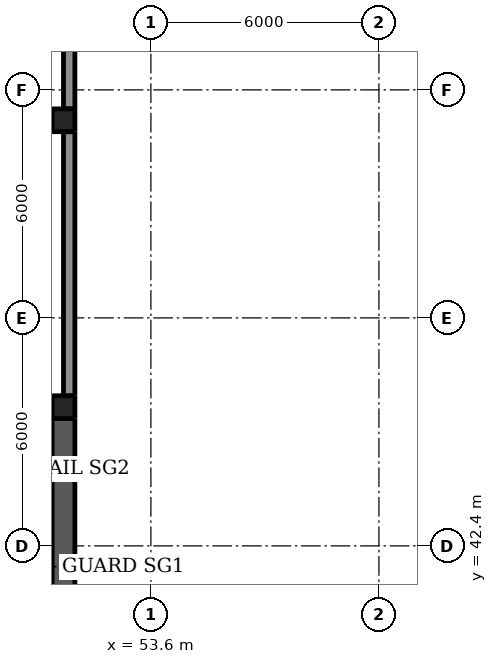
"""IFC4 building model, lengths in metres.
Left out: names, types, materials, properties, quantities, classifications, styles, units other than length and angle.
Written with IfcOpenShell. Run it as: python <this file> out.ifc"""

import sys

from ifc_helpers import new_model, si_unit, direction, frame, frame_2d, origin, origin_2d, place, context, subcontext, project, spatial, rectangle, extrude, element, fill, save


model = new_model("IFC4")
c1 = context("Model", 3, precision=1e-05, world=origin(), true_north=direction((0.0, 1.0)))
c2 = subcontext(c1, "Body", "Model", "MODEL_VIEW")
j1 = project(units=[si_unit("LENGTHUNIT", "METRE"), si_unit("PLANEANGLEUNIT", "RADIAN")], contexts=[c1])
p1 = place(None, origin())
s1 = spatial("IfcSite", under=j1, at=p1, CompositionType="ELEMENT")
p2 = place(p1, origin())
s2 = spatial("IfcBuilding", under=s1, at=p2, CompositionType="ELEMENT")
p3 = place(p2, frame((0.0, 0.0, 19.0)))
s3 = spatial("IfcBuildingStorey", under=s2, at=p3, CompositionType="ELEMENT", Elevation=19.0)
for number, where, z_axis, x_axis in (
    (1, (52.6, 42.4, 0.0), (0.0, 0.0, 1.0), (1.0, 0.0, 0.0)),
    (2, (52.6, 48.4, 0.0), (0.0, 0.0, 1.0), (1.0, 0.0, 0.0)),
    (3, (52.6, 54.4, 0.0), (0.0, 0.0, 1.0), (1.0, 0.0, 0.0)),
):
    element("IfcColumn", number, at=place(p3, frame(where, z_axis=z_axis, x_axis=x_axis)), inside=s3, PredefinedType="COLUMN", context=c2, shape_type="SweptSolid", body=[
        extrude(rectangle(XDim=1.2, YDim=1.2, at=origin_2d()), origin(), (0.0, 0.0, 1.0), 4.25),
    ])
for number, where, z_axis, x_axis in (
    (4, (51.3, 46.05, -0.3), (0.0, 0.0, 1.0), (1.0, 0.0, 0.0)),
    (5, (51.3, 53.6, -0.3), (0.0, 0.0, 1.0), (1.0, 0.0, 0.0)),
):
    element("IfcColumn", number, at=place(p3, frame(where, z_axis=z_axis, x_axis=x_axis)), inside=s3, PredefinedType="COLUMN", context=c2, shape_type="SweptSolid", body=[
        extrude(rectangle(XDim=0.6, YDim=0.6, at=origin_2d()), origin(), (0.0, 0.0, 1.0), 4.35),
    ])
p4 = place(p3, frame((51.3, 38.8, -0.3), z_axis=(0.0, 0.0, 1.0), x_axis=(0.0, 1.0, 0.0)))
e6 = element("IfcWall", 6, at=p4, inside=s3, PredefinedType="SHEAR", context=c2, shape_type="SweptSolid", body=[
    extrude(rectangle(XDim=6.95, YDim=0.6, at=frame_2d((3.475, 0.0))), origin(), (0.0, 0.0, 1.0), 4.8),
])
for number, where, z_axis, x_axis in (
    (7, (52.125, 37.0, 0.0), (0.0, 0.0, 1.0), (0.0, 1.0, 0.0)),
    (8, (52.125, 43.0, 0.0), (0.0, 0.0, 1.0), (0.0, 1.0, 0.0)),
    (9, (52.125, 49.0, 0.0), (0.0, 0.0, 1.0), (0.0, 1.0, 0.0)),
    (10, (52.125, 55.0, 0.0), (0.0, 0.0, 1.0), (0.0, 1.0, 0.0)),
):
    element("IfcWall", number, at=place(p3, frame(where, z_axis=z_axis, x_axis=x_axis)), inside=s3, PredefinedType="SOLIDWALL", context=c2, shape_type="SweptSolid", body=[
        extrude(rectangle(XDim=4.8, YDim=0.25, at=frame_2d((2.4, 0.0))), origin(), (0.0, 0.0, 1.0), 4.25),
    ])
p5 = place(p3, frame((51.45, 46.35, 0.0), z_axis=(0.0, 0.0, 1.0), x_axis=(0.0, 1.0, 0.0)))
e11 = element("IfcWall", 11, at=p5, inside=s3, PredefinedType="SOLIDWALL", context=c2, shape_type="SweptSolid", body=[
    extrude(rectangle(XDim=6.95, YDim=0.3, at=frame_2d((3.475, 0.0))), origin(), (0.0, 0.0, 1.0), 3.15),
])
p6 = place(p3, frame((51.45, 53.9, 0.0), z_axis=(0.0, 0.0, 1.0), x_axis=(0.0, 1.0, 0.0)))
e12 = element("IfcWall", 12, at=p6, inside=s3, PredefinedType="SOLIDWALL", context=c2, shape_type="SweptSolid", body=[
    extrude(rectangle(XDim=6.95, YDim=0.3, at=frame_2d((3.475, 0.0))), origin(), (0.0, 0.0, 1.0), 3.15),
])
p7 = place(p3, frame((53.2, 42.4, 0.0), z_axis=(0.0, 0.0, 1.0), x_axis=(1.0, 0.0, 0.0)))
e13 = element("IfcWall", 13, at=p7, inside=s3, PredefinedType="PARTITIONING", context=c2, shape_type="SweptSolid", body=[
    extrude(rectangle(XDim=6.325, YDim=0.1, at=frame_2d((3.163, 0.0))), origin(), (0.0, 0.0, 1.0), 3.415),
])
p8 = place(p3, frame((53.2, 54.4, 0.0), z_axis=(0.0, 0.0, 1.0), x_axis=(1.0, 0.0, 0.0)))
e14 = element("IfcWall", 14, at=p8, inside=s3, PredefinedType="PARTITIONING", context=c2, shape_type="SweptSolid", body=[
    extrude(rectangle(XDim=6.325, YDim=0.1, at=frame_2d((3.163, 0.0))), origin(), (0.0, 0.0, 1.0), 3.409),
])
p9 = place(p3, frame((59.6, 36.546, 0.0), z_axis=(0.0, 0.0, 1.0), x_axis=(0.0, 1.0, 0.0)))
e15 = element("IfcWall", 15, at=p9, inside=s3, PredefinedType="PARTITIONING", context=c2, shape_type="SweptSolid", body=[
    extrude(rectangle(XDim=5.708, YDim=0.15, at=frame_2d((2.854, 0.0))), origin(), (0.0, 0.0, 1.0), 4.25),
])
p10 = place(p9, frame((0.204, 0.0, 0.0)))
e16 = element("IfcOpeningElement", 16, at=p10, cuts=e15, PredefinedType="OPENING", context=c2, shape_type="SweptSolid", body=[
    extrude(rectangle(XDim=1.8, YDim=2.1, at=frame_2d((0.9, 1.05))), frame((0.0, 0.085, 0.0), z_axis=(0.0, -1.0, 0.0), x_axis=(1.0, 0.0, 0.0)), (0.0, 0.0, 1.0), 0.17),
])
p11 = place(p3, frame((59.6, 42.254, 0.0), z_axis=(0.0, 0.0, 1.0), x_axis=(0.0, 1.0, 0.0)))
e17 = element("IfcWall", 17, at=p11, inside=s3, PredefinedType="PARTITIONING", context=c2, shape_type="SweptSolid", body=[
    extrude(rectangle(XDim=0.292, YDim=0.15, at=frame_2d((0.146, 0.0))), origin(), (0.0, 0.0, 1.0), 3.415),
])
p12 = place(p3, frame((59.6, 42.546, 0.0), z_axis=(0.0, 0.0, 1.0), x_axis=(0.0, 1.0, 0.0)))
e18 = element("IfcWall", 18, at=p12, inside=s3, PredefinedType="PARTITIONING", context=c2, shape_type="SweptSolid", body=[
    extrude(rectangle(XDim=5.708, YDim=0.15, at=frame_2d((2.854, 0.0))), origin(), (0.0, 0.0, 1.0), 4.25),
])
p13 = place(p3, frame((59.6, 48.254, 0.0), z_axis=(0.0, 0.0, 1.0), x_axis=(0.0, 1.0, 0.0)))
e19 = element("IfcWall", 19, at=p13, inside=s3, PredefinedType="PARTITIONING", context=c2, shape_type="SweptSolid", body=[
    extrude(rectangle(XDim=0.292, YDim=0.15, at=frame_2d((0.146, 0.0))), origin(), (0.0, 0.0, 1.0), 3.415),
])
p14 = place(p3, frame((59.6, 48.546, 0.0), z_axis=(0.0, 0.0, 1.0), x_axis=(0.0, 1.0, 0.0)))
e20 = element("IfcWall", 20, at=p14, inside=s3, PredefinedType="PARTITIONING", context=c2, shape_type="SweptSolid", body=[
    extrude(rectangle(XDim=5.708, YDim=0.15, at=frame_2d((2.854, 0.0))), origin(), (0.0, 0.0, 1.0), 4.25),
])
p15 = place(p14, frame((0.204, 0.0, 0.0)))
e21 = element("IfcOpeningElement", 21, at=p15, cuts=e20, PredefinedType="OPENING", context=c2, shape_type="SweptSolid", body=[
    extrude(rectangle(XDim=1.8, YDim=2.1, at=frame_2d((0.9, 1.05))), frame((0.0, 0.085, 0.0), z_axis=(0.0, -1.0, 0.0), x_axis=(1.0, 0.0, 0.0)), (0.0, 0.0, 1.0), 0.17),
])
p16 = place(p3, frame((59.6, 54.254, 0.0), z_axis=(0.0, 0.0, 1.0), x_axis=(0.0, 1.0, 0.0)))
e22 = element("IfcWall", 22, at=p16, inside=s3, PredefinedType="PARTITIONING", context=c2, shape_type="SweptSolid", body=[
    extrude(rectangle(XDim=0.287, YDim=0.15, at=frame_2d((0.143, 0.0))), origin(), (0.0, 0.0, 1.0), 3.409),
])
p17 = place(p3, frame((59.6, 54.546, 0.0), z_axis=(0.0, 0.0, 1.0), x_axis=(0.0, 1.0, 0.0)))
e23 = element("IfcWall", 23, at=p17, inside=s3, PredefinedType="PARTITIONING", context=c2, shape_type="SweptSolid", body=[
    extrude(rectangle(XDim=5.779, YDim=0.15, at=frame_2d((2.89, 0.0))), origin(), (0.0, 0.0, 1.0), 2.947),
])
p18 = place(p17, frame((2.354, 0.0, 0.0)))
e24 = element("IfcOpeningElement", 24, at=p18, cuts=e23, PredefinedType="OPENING", context=c2, shape_type="SweptSolid", body=[
    extrude(rectangle(XDim=1.0, YDim=2.1, at=frame_2d((0.5, 1.05))), frame((0.0, 0.085, 0.0), z_axis=(0.0, -1.0, 0.0), x_axis=(1.0, 0.0, 0.0)), (0.0, 0.0, 1.0), 0.17),
])
p19 = place(p15, origin())
e25 = element("IfcDoor", 25, at=p19, inside=s3, OperationType="DOUBLE_DOOR_SINGLE_SWING", PredefinedType="DOOR", context=c2, shape_type="SweptSolid", body=[
    extrude(rectangle(XDim=1.8, YDim=2.1, at=frame_2d((0.9, 1.05))), frame((0.0, 0.025, 0.0), z_axis=(0.0, -1.0, 0.0), x_axis=(1.0, 0.0, 0.0)), (0.0, 0.0, 1.0), 0.05),
])
fill(e21, e25)
save(model, sys.argv[1])
